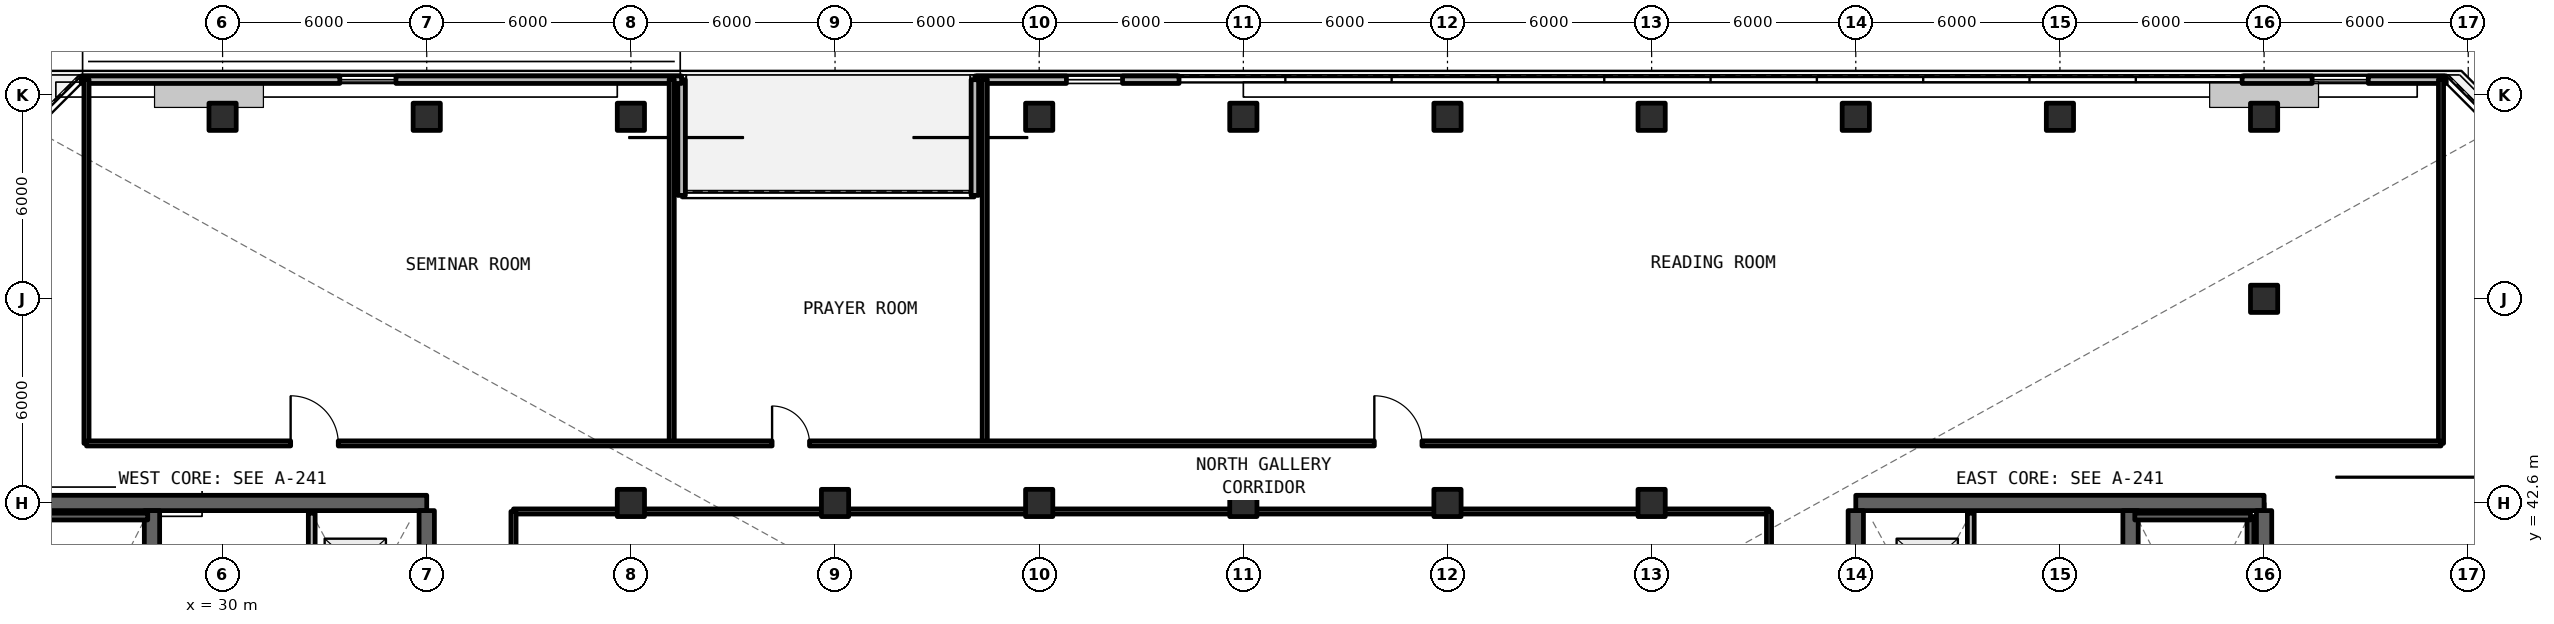
"""IFC4 building model, lengths in metres.
Left out: names, types, materials, properties, quantities, classifications, styles, units other than length and angle.
Written with IfcOpenShell. Run it as: python <this file> out.ifc"""

import sys

from ifc_helpers import new_model, si_unit, direction, frame, frame_2d, origin, origin_2d, place, context, subcontext, project, spatial, rectangle, extrude, element, fill, save


model = new_model("IFC4")
c1 = context("Model", 3, precision=1e-05, world=origin(), true_north=direction((0.0, 1.0)))
c2 = subcontext(c1, "Body", "Model", "MODEL_VIEW")
j1 = project(units=[si_unit("LENGTHUNIT", "METRE"), si_unit("PLANEANGLEUNIT", "RADIAN")], contexts=[c1])
p1 = place(None, origin())
s1 = spatial("IfcSite", under=j1, at=p1, CompositionType="ELEMENT")
p2 = place(p1, origin())
s2 = spatial("IfcBuilding", under=s1, at=p2, CompositionType="ELEMENT")
p3 = place(p2, frame((0.0, 0.0, 177.87)))
s3 = spatial("IfcBuildingStorey", under=s2, at=p3, CompositionType="ELEMENT", Elevation=177.87)
p4 = place(p3, frame((36.0, 42.6, 0.0), z_axis=(0.0, 0.0, 1.0), x_axis=(-1.0, 0.0, 0.0)))
e1 = element("IfcWall", 1, at=p4, inside=s3, PredefinedType="SHEAR", context=c2, shape_type="SweptSolid", body=[
    extrude(rectangle(XDim=12.0, YDim=0.45, at=frame_2d((6.0, 0.0))), origin(), (0.0, 0.0, 1.0), 3.96),
])
p5 = place(p3, frame((36.0, 36.8, 0.0), z_axis=(0.0, 0.0, 1.0), x_axis=(0.0, 1.0, 0.0)))
e2 = element("IfcWall", 2, at=p5, inside=s3, PredefinedType="SHEAR", context=c2, shape_type="SweptSolid", body=[
    extrude(rectangle(XDim=5.575, YDim=0.45, at=frame_2d((2.788, 0.0))), origin(), (0.0, 0.0, 1.0), 3.96),
])
p6 = place(p3, frame((27.925, 24.825, 0.0), z_axis=(0.0, 0.0, 1.0), x_axis=(0.0, 1.0, 0.0)))
e3 = element("IfcWall", 3, at=p6, inside=s3, PredefinedType="SHEAR", context=c2, shape_type="SweptSolid", body=[
    extrude(rectangle(XDim=17.55, YDim=0.45, at=frame_2d((8.775, 0.0))), origin(), (0.0, 0.0, 1.0), 3.96),
])
p7 = place(p6, frame((0.425, 0.0, 0.0)))
e4 = element("IfcOpeningElement", 4, at=p7, cuts=e3, PredefinedType="OPENING", context=c2, shape_type="SweptSolid", body=[
    extrude(rectangle(XDim=1.15, YDim=2.15, at=frame_2d((0.575, 1.075))), frame((0.0, 0.235, 0.0), z_axis=(0.0, -1.0, 0.0), x_axis=(1.0, 0.0, 0.0)), (0.0, 0.0, 1.0), 0.47),
])
p8 = place(p6, frame((9.625, 0.0, 0.0)))
e5 = element("IfcOpeningElement", 5, at=p8, cuts=e3, PredefinedType="OPENING", context=c2, shape_type="SweptSolid", body=[
    extrude(rectangle(XDim=1.15, YDim=2.15, at=frame_2d((0.575, 1.075))), frame((0.0, 0.235, 0.0), z_axis=(0.0, -1.0, 0.0), x_axis=(1.0, 0.0, 0.0)), (0.0, 0.0, 1.0), 0.47),
])
p9 = place(p3, frame((90.0, 42.6, 0.0), z_axis=(0.0, 0.0, 1.0), x_axis=(-1.0, 0.0, 0.0)))
e6 = element("IfcWall", 6, at=p9, inside=s3, PredefinedType="SHEAR", context=c2, shape_type="SweptSolid", body=[
    extrude(rectangle(XDim=12.0, YDim=0.45, at=frame_2d((6.0, 0.0))), origin(), (0.0, 0.0, 1.0), 3.96),
])
p10 = place(p3, frame((90.0, 24.825, 0.0), z_axis=(0.0, 0.0, 1.0), x_axis=(0.0, 1.0, 0.0)))
e7 = element("IfcWall", 7, at=p10, inside=s3, PredefinedType="SHEAR", context=c2, shape_type="SweptSolid", body=[
    extrude(rectangle(XDim=17.55, YDim=0.45, at=frame_2d((8.775, 0.0))), origin(), (0.0, 0.0, 1.0), 3.96),
])
p11 = place(p3, frame((78.0, 36.8, 0.0), z_axis=(0.0, 0.0, 1.0), x_axis=(0.0, 1.0, 0.0)))
e8 = element("IfcWall", 8, at=p11, inside=s3, PredefinedType="SHEAR", context=c2, shape_type="SweptSolid", body=[
    extrude(rectangle(XDim=5.575, YDim=0.45, at=frame_2d((2.788, 0.0))), origin(), (0.0, 0.0, 1.0), 3.96),
])
p12 = place(p3, frame((86.075, 24.825, 0.0), z_axis=(0.0, 0.0, 1.0), x_axis=(0.0, 1.0, 0.0)))
e9 = element("IfcWall", 9, at=p12, inside=s3, PredefinedType="SHEAR", context=c2, shape_type="SweptSolid", body=[
    extrude(rectangle(XDim=17.55, YDim=0.45, at=frame_2d((8.775, 0.0))), origin(), (0.0, 0.0, 1.0), 3.96),
])
p13 = place(p12, frame((0.425, 0.0, 0.0)))
e10 = element("IfcOpeningElement", 10, at=p13, cuts=e9, PredefinedType="OPENING", context=c2, shape_type="SweptSolid", body=[
    extrude(rectangle(XDim=1.15, YDim=2.15, at=frame_2d((0.575, 1.075))), frame((0.0, 0.235, 0.0), z_axis=(0.0, -1.0, 0.0), x_axis=(1.0, 0.0, 0.0)), (0.0, 0.0, 1.0), 0.47),
])
p14 = place(p12, frame((9.625, 0.0, 0.0)))
e11 = element("IfcOpeningElement", 11, at=p14, cuts=e9, PredefinedType="OPENING", context=c2, shape_type="SweptSolid", body=[
    extrude(rectangle(XDim=1.15, YDim=2.15, at=frame_2d((0.575, 1.075))), frame((0.0, 0.235, 0.0), z_axis=(0.0, -1.0, 0.0), x_axis=(1.0, 0.0, 0.0)), (0.0, 0.0, 1.0), 0.47),
])
for number, where, z_axis, x_axis in (
    (12, (42.0, 42.6, 0.0), (0.0, 0.0, 1.0), (1.0, 0.0, 0.0)),
    (13, (48.0, 42.6, 0.0), (0.0, 0.0, 1.0), (1.0, 0.0, 0.0)),
    (14, (54.0, 42.6, 0.0), (0.0, 0.0, 1.0), (1.0, 0.0, 0.0)),
    (15, (60.0, 42.6, 0.0), (0.0, 0.0, 1.0), (1.0, 0.0, 0.0)),
    (16, (66.0, 42.6, 0.0), (0.0, 0.0, 1.0), (1.0, 0.0, 0.0)),
    (17, (72.0, 42.6, 0.0), (0.0, 0.0, 1.0), (1.0, 0.0, 0.0)),
    (18, (90.0, 48.6, 0.0), (0.0, 0.0, 1.0), (1.0, 0.0, 0.0)),
):
    element("IfcColumn", number, at=place(p3, frame(where, z_axis=z_axis, x_axis=x_axis)), inside=s3, PredefinedType="COLUMN", context=c2, shape_type="SweptSolid", body=[
        extrude(rectangle(XDim=0.8, YDim=0.8, at=origin_2d()), origin(), (0.0, 0.0, 1.0), 3.96),
    ])
for number, where, z_axis, x_axis in (
    (19, (30.0, 53.95, -0.28), (0.0, 0.0, 1.0), (1.0, 0.0, 0.0)),
    (20, (36.0, 53.95, -0.28), (0.0, 0.0, 1.0), (1.0, 0.0, 0.0)),
    (21, (42.0, 53.95, -0.28), (0.0, 0.0, 1.0), (1.0, 0.0, 0.0)),
    (22, (54.0, 53.95, -0.28), (0.0, 0.0, 1.0), (1.0, 0.0, 0.0)),
    (23, (60.0, 53.95, -0.28), (0.0, 0.0, 1.0), (1.0, 0.0, 0.0)),
    (24, (66.0, 53.95, -0.28), (0.0, 0.0, 1.0), (1.0, 0.0, 0.0)),
    (25, (72.0, 53.95, -0.28), (0.0, 0.0, 1.0), (1.0, 0.0, 0.0)),
    (26, (78.0, 53.95, -0.28), (0.0, 0.0, 1.0), (1.0, 0.0, 0.0)),
    (27, (84.0, 53.95, -0.28), (0.0, 0.0, 1.0), (1.0, 0.0, 0.0)),
    (28, (90.0, 53.95, -0.28), (0.0, 0.0, 1.0), (1.0, 0.0, 0.0)),
):
    element("IfcColumn", number, at=place(p3, frame(where, z_axis=z_axis, x_axis=x_axis)), inside=s3, PredefinedType="COLUMN", context=c2, shape_type="SweptSolid", body=[
        extrude(rectangle(XDim=0.8, YDim=0.8, at=origin_2d()), origin(), (0.0, 0.0, 1.0), 4.24),
    ])
p15 = place(p3, frame((95.354, 55.04, 0.0), z_axis=(0.0, 0.0, 1.0), x_axis=(-1.0, 0.0, 0.0)))
e29 = element("IfcWall", 29, at=p15, inside=s3, PredefinedType="SOLIDWALL", context=c2, shape_type="SweptSolid", body=[
    extrude(rectangle(XDim=6.0, YDim=0.22, at=frame_2d((3.0, 0.0))), origin(), (0.0, 0.0, 1.0), 3.74),
])
p16 = place(p15, frame((2.292, 0.0, 0.78)))
e30 = element("IfcOpeningElement", 30, at=p16, cuts=e29, PredefinedType="OPENING", context=c2, shape_type="SweptSolid", body=[
    extrude(rectangle(XDim=1.65, YDim=1.66, at=frame_2d((0.825, 0.83))), frame((0.0, 0.12, 0.0), z_axis=(0.0, -1.0, 0.0), x_axis=(1.0, 0.0, 0.0)), (0.0, 0.0, 1.0), 0.24),
])
p17 = place(p3, frame((58.11, 55.04, 0.0), z_axis=(0.0, 0.0, 1.0), x_axis=(-1.0, 0.0, 0.0)))
e31 = element("IfcWall", 31, at=p17, inside=s3, PredefinedType="SOLIDWALL", context=c2, shape_type="SweptSolid", body=[
    extrude(rectangle(XDim=6.0, YDim=0.22, at=frame_2d((3.0, 0.0))), origin(), (0.0, 0.0, 1.0), 3.74),
])
p18 = place(p17, frame((1.66, 0.0, 0.78)))
e32 = element("IfcOpeningElement", 32, at=p18, cuts=e31, PredefinedType="OPENING", context=c2, shape_type="SweptSolid", body=[
    extrude(rectangle(XDim=1.65, YDim=1.66, at=frame_2d((0.825, 0.83))), frame((0.0, 0.12, 0.0), z_axis=(0.0, -1.0, 0.0), x_axis=(1.0, 0.0, 0.0)), (0.0, 0.0, 1.0), 0.24),
])
for number, where, z_axis, x_axis in (
    (33, (52.11, 55.04, 0.0), (0.0, 0.0, 1.0), (0.0, -1.0, 0.0)),
    (34, (43.49, 51.64, 0.0), (0.0, 0.0, 1.0), (0.0, 1.0, 0.0)),
):
    element("IfcWall", number, at=place(p3, frame(where, z_axis=z_axis, x_axis=x_axis)), inside=s3, PredefinedType="SOLIDWALL", context=c2, shape_type="SweptSolid", body=[
        extrude(rectangle(XDim=3.4, YDim=0.22, at=frame_2d((1.7, 0.0))), origin(), (0.0, 0.0, 1.0), 3.74),
    ])
p19 = place(p3, frame((43.49, 55.04, 0.0), z_axis=(0.0, 0.0, 1.0), x_axis=(-1.0, 0.0, 0.0)))
e35 = element("IfcWall", 35, at=p19, inside=s3, PredefinedType="SOLIDWALL", context=c2, shape_type="SweptSolid", body=[
    extrude(rectangle(XDim=17.644, YDim=0.22, at=frame_2d((8.822, 0.0))), origin(), (0.0, 0.0, 1.0), 3.74),
])
p20 = place(p19, frame((8.395, 0.0, 0.78)))
e36 = element("IfcOpeningElement", 36, at=p20, cuts=e35, PredefinedType="OPENING", context=c2, shape_type="SweptSolid", body=[
    extrude(rectangle(XDim=1.65, YDim=1.66, at=frame_2d((0.825, 0.83))), frame((0.0, 0.12, 0.0), z_axis=(0.0, -1.0, 0.0), x_axis=(1.0, 0.0, 0.0)), (0.0, 0.0, 1.0), 0.24),
])
p21 = place(p3, frame((32.62, 36.88, 0.0), z_axis=(0.0, 0.0, 1.0), x_axis=(0.0, 1.0, 0.0)))
e37 = element("IfcWall", 37, at=p21, inside=s3, PredefinedType="SOLIDWALL", context=c2, shape_type="SweptSolid", body=[
    extrude(rectangle(XDim=5.42, YDim=0.2, at=frame_2d((2.71, 0.0))), origin(), (0.0, 0.0, 1.0), 2.96),
])
p22 = place(p21, frame((0.8, 0.0, 0.0)))
e38 = element("IfcOpeningElement", 38, at=p22, cuts=e37, PredefinedType="OPENING", context=c2, shape_type="SweptSolid", body=[
    extrude(rectangle(XDim=1.1, YDim=2.2, at=frame_2d((0.55, 1.1))), frame((0.0, 0.11, 0.0), z_axis=(0.0, -1.0, 0.0), x_axis=(1.0, 0.0, 0.0)), (0.0, 0.0, 1.0), 0.22),
])
p23 = place(p21, frame((3.3, 0.0, 0.0)))
e39 = element("IfcOpeningElement", 39, at=p23, cuts=e37, PredefinedType="OPENING", context=c2, shape_type="SweptSolid", body=[
    extrude(rectangle(XDim=1.1, YDim=2.2, at=frame_2d((0.55, 1.1))), frame((0.0, 0.11, 0.0), z_axis=(0.0, -1.0, 0.0), x_axis=(1.0, 0.0, 0.0)), (0.0, 0.0, 1.0), 0.22),
])
p24 = place(p3, frame((81.38, 36.88, 0.0), z_axis=(0.0, 0.0, 1.0), x_axis=(0.0, 1.0, 0.0)))
e40 = element("IfcWall", 40, at=p24, inside=s3, PredefinedType="SOLIDWALL", context=c2, shape_type="SweptSolid", body=[
    extrude(rectangle(XDim=5.42, YDim=0.2, at=frame_2d((2.71, 0.0))), origin(), (0.0, 0.0, 1.0), 2.96),
])
p25 = place(p24, frame((0.8, 0.0, 0.0)))
e41 = element("IfcOpeningElement", 41, at=p25, cuts=e40, PredefinedType="OPENING", context=c2, shape_type="SweptSolid", body=[
    extrude(rectangle(XDim=1.1, YDim=2.2, at=frame_2d((0.55, 1.1))), frame((0.0, 0.11, 0.0), z_axis=(0.0, -1.0, 0.0), x_axis=(1.0, 0.0, 0.0)), (0.0, 0.0, 1.0), 0.22),
])
p26 = place(p24, frame((3.3, 0.0, 0.0)))
e42 = element("IfcOpeningElement", 42, at=p26, cuts=e40, PredefinedType="OPENING", context=c2, shape_type="SweptSolid", body=[
    extrude(rectangle(XDim=1.1, YDim=2.2, at=frame_2d((0.55, 1.1))), frame((0.0, 0.11, 0.0), z_axis=(0.0, -1.0, 0.0), x_axis=(1.0, 0.0, 0.0)), (0.0, 0.0, 1.0), 0.22),
])
p27 = place(p3, frame((38.55, 42.35, 0.0), z_axis=(0.0, 0.0, 1.0), x_axis=(1.0, 0.0, 0.0)))
e43 = element("IfcWall", 43, at=p27, inside=s3, PredefinedType="SOLIDWALL", context=c2, shape_type="SweptSolid", body=[
    extrude(rectangle(XDim=36.9, YDim=0.15, at=frame_2d((18.45, 0.0))), origin(), (0.0, 0.0, 1.0), 2.96),
])
p28 = place(p3, frame((38.55, 24.85, 0.0), z_axis=(0.0, 0.0, 1.0), x_axis=(0.0, 1.0, 0.0)))
e44 = element("IfcWall", 44, at=p28, inside=s3, PredefinedType="SOLIDWALL", context=c2, shape_type="SweptSolid", body=[
    extrude(rectangle(XDim=17.5, YDim=0.15, at=frame_2d((8.75, 0.0))), origin(), (0.0, 0.0, 1.0), 2.96),
])
p29 = place(p28, frame((7.8, 0.0, 0.0)))
e45 = element("IfcOpeningElement", 45, at=p29, cuts=e44, PredefinedType="OPENING", context=c2, shape_type="SweptSolid", body=[
    extrude(rectangle(XDim=1.4, YDim=2.15, at=frame_2d((0.7, 1.075))), frame((0.0, 0.085, 0.0), z_axis=(0.0, -1.0, 0.0), x_axis=(1.0, 0.0, 0.0)), (0.0, 0.0, 1.0), 0.17),
])
p30 = place(p3, frame((75.45, 24.85, 0.0), z_axis=(0.0, 0.0, 1.0), x_axis=(0.0, 1.0, 0.0)))
e46 = element("IfcWall", 46, at=p30, inside=s3, PredefinedType="SOLIDWALL", context=c2, shape_type="SweptSolid", body=[
    extrude(rectangle(XDim=17.5, YDim=0.15, at=frame_2d((8.75, 0.0))), origin(), (0.0, 0.0, 1.0), 2.96),
])
p31 = place(p3, frame((26.0, 44.35, 0.0), z_axis=(0.0, 0.0, 1.0), x_axis=(0.0, 1.0, 0.0)))
e47 = element("IfcWall", 47, at=p31, inside=s3, PredefinedType="SOLIDWALL", context=c2, shape_type="SweptSolid", body=[
    extrude(rectangle(XDim=10.7, YDim=0.15, at=frame_2d((5.35, 0.0))), origin(), (0.0, 0.0, 1.0), 2.96),
])
for number, where, z_axis, x_axis in (
    (48, (43.2, 44.35, 0.0), (0.0, 0.0, 1.0), (0.0, 1.0, 0.0)),
    (49, (52.4, 44.35, 0.0), (0.0, 0.0, 1.0), (0.0, 1.0, 0.0)),
):
    element("IfcWall", number, at=place(p3, frame(where, z_axis=z_axis, x_axis=x_axis)), inside=s3, PredefinedType="PARTITIONING", context=c2, shape_type="SweptSolid", body=[
        extrude(rectangle(XDim=10.7, YDim=0.15, at=frame_2d((5.35, 0.0))), origin(), (0.0, 0.0, 1.0), 2.96),
    ])
p32 = place(p3, frame((95.2, 44.35, 0.0), z_axis=(0.0, 0.0, 1.0), x_axis=(0.0, 1.0, 0.0)))
e50 = element("IfcWall", 50, at=p32, inside=s3, PredefinedType="SOLIDWALL", context=c2, shape_type="SweptSolid", body=[
    extrude(rectangle(XDim=10.7, YDim=0.15, at=frame_2d((5.35, 0.0))), origin(), (0.0, 0.0, 1.0), 2.96),
])
p33 = place(p3, frame((26.0, 44.35, 0.0), z_axis=(0.0, 0.0, 1.0), x_axis=(1.0, 0.0, 0.0)))
e51 = element("IfcWall", 51, at=p33, inside=s3, PredefinedType="SOLIDWALL", context=c2, shape_type="SweptSolid", body=[
    extrude(rectangle(XDim=69.2, YDim=0.15, at=frame_2d((34.6, 0.0))), origin(), (0.0, 0.0, 1.0), 2.96),
])
p34 = place(p33, frame((6.0, 0.0, 0.0)))
e52 = element("IfcOpeningElement", 52, at=p34, cuts=e51, PredefinedType="OPENING", context=c2, shape_type="SweptSolid", body=[
    extrude(rectangle(XDim=1.4, YDim=2.15, at=frame_2d((0.7, 1.075))), frame((0.0, 0.085, 0.0), z_axis=(0.0, -1.0, 0.0), x_axis=(1.0, 0.0, 0.0)), (0.0, 0.0, 1.0), 0.17),
])
p35 = place(p33, frame((20.15, 0.0, 0.0)))
e53 = element("IfcOpeningElement", 53, at=p35, cuts=e51, PredefinedType="OPENING", context=c2, shape_type="SweptSolid", body=[
    extrude(rectangle(XDim=1.1, YDim=2.15, at=frame_2d((0.55, 1.075))), frame((0.0, 0.085, 0.0), z_axis=(0.0, -1.0, 0.0), x_axis=(1.0, 0.0, 0.0)), (0.0, 0.0, 1.0), 0.17),
])
p36 = place(p33, frame((37.85, 0.0, 0.0)))
e54 = element("IfcOpeningElement", 54, at=p36, cuts=e51, PredefinedType="OPENING", context=c2, shape_type="SweptSolid", body=[
    extrude(rectangle(XDim=1.4, YDim=2.15, at=frame_2d((0.7, 1.075))), frame((0.0, 0.085, 0.0), z_axis=(0.0, -1.0, 0.0), x_axis=(1.0, 0.0, 0.0)), (0.0, 0.0, 1.0), 0.17),
])
p37 = place(p3, frame((27.8, 42.2, 0.0), z_axis=(0.0, 0.0, 1.0), x_axis=(-1.0, 0.0, 0.0)))
e55 = element("IfcWall", 55, at=p37, inside=s3, PredefinedType="SOLIDWALL", context=c2, shape_type="SweptSolid", body=[
    extrude(rectangle(XDim=3.4, YDim=0.2, at=frame_2d((1.7, 0.0))), origin(), (0.0, 0.0, 1.0), 3.96),
])
p38 = place(p3, frame((89.6, 34.2, 0.0), z_axis=(0.0, 0.0, 1.0), x_axis=(0.0, 1.0, 0.0)))
e56 = element("IfcWall", 56, at=p38, inside=s3, PredefinedType="SOLIDWALL", context=c2, shape_type="SweptSolid", body=[
    extrude(rectangle(XDim=8.0, YDim=0.2, at=frame_2d((4.0, 0.0))), origin(), (0.0, 0.0, 1.0), 3.96),
])
p39 = place(p3, frame((89.6, 42.2, 0.0), z_axis=(0.0, 0.0, 1.0), x_axis=(-1.0, 0.0, 0.0)))
e57 = element("IfcWall", 57, at=p39, inside=s3, PredefinedType="SOLIDWALL", context=c2, shape_type="SweptSolid", body=[
    extrude(rectangle(XDim=3.4, YDim=0.2, at=frame_2d((1.7, 0.0))), origin(), (0.0, 0.0, 1.0), 3.96),
])
p40 = place(p16, origin())
e58 = element("IfcWindow", 58, at=p40, inside=s3, PartitioningType="SINGLE_PANEL", PredefinedType="WINDOW", context=c2, shape_type="SweptSolid", body=[
    extrude(rectangle(XDim=1.65, YDim=1.66, at=frame_2d((0.825, 0.83))), frame((0.0, 0.03, 0.0), z_axis=(0.0, -1.0, 0.0), x_axis=(1.0, 0.0, 0.0)), (0.0, 0.0, 1.0), 0.06),
])
fill(e30, e58)
p41 = place(p18, origin())
e59 = element("IfcWindow", 59, at=p41, inside=s3, PartitioningType="SINGLE_PANEL", PredefinedType="WINDOW", context=c2, shape_type="SweptSolid", body=[
    extrude(rectangle(XDim=1.65, YDim=1.66, at=frame_2d((0.825, 0.83))), frame((0.0, 0.03, 0.0), z_axis=(0.0, -1.0, 0.0), x_axis=(1.0, 0.0, 0.0)), (0.0, 0.0, 1.0), 0.06),
])
fill(e32, e59)
p42 = place(p20, origin())
e60 = element("IfcWindow", 60, at=p42, inside=s3, PartitioningType="SINGLE_PANEL", PredefinedType="WINDOW", context=c2, shape_type="SweptSolid", body=[
    extrude(rectangle(XDim=1.65, YDim=1.66, at=frame_2d((0.825, 0.83))), frame((0.0, 0.03, 0.0), z_axis=(0.0, -1.0, 0.0), x_axis=(1.0, 0.0, 0.0)), (0.0, 0.0, 1.0), 0.06),
])
fill(e36, e60)
p43 = place(p34, origin())
e61 = element("IfcDoor", 61, at=p43, inside=s3, OperationType="SINGLE_SWING_RIGHT", PredefinedType="DOOR", context=c2, shape_type="SweptSolid", body=[
    extrude(rectangle(XDim=1.4, YDim=2.15, at=frame_2d((0.7, 1.075))), frame((0.0, 0.025, 0.0), z_axis=(0.0, -1.0, 0.0), x_axis=(1.0, 0.0, 0.0)), (0.0, 0.0, 1.0), 0.05),
])
fill(e52, e61)
p44 = place(p35, origin())
e62 = element("IfcDoor", 62, at=p44, inside=s3, OperationType="SINGLE_SWING_LEFT", PredefinedType="DOOR", context=c2, shape_type="SweptSolid", body=[
    extrude(rectangle(XDim=1.1, YDim=2.15, at=frame_2d((0.55, 1.075))), frame((0.0, 0.025, 0.0), z_axis=(0.0, -1.0, 0.0), x_axis=(1.0, 0.0, 0.0)), (0.0, 0.0, 1.0), 0.05),
])
fill(e53, e62)
p45 = place(p36, origin())
e63 = element("IfcDoor", 63, at=p45, inside=s3, OperationType="SINGLE_SWING_RIGHT", PredefinedType="DOOR", context=c2, shape_type="SweptSolid", body=[
    extrude(rectangle(XDim=1.4, YDim=2.15, at=frame_2d((0.7, 1.075))), frame((0.0, 0.025, 0.0), z_axis=(0.0, -1.0, 0.0), x_axis=(1.0, 0.0, 0.0)), (0.0, 0.0, 1.0), 0.05),
])
fill(e54, e63)
save(model, sys.argv[1])
